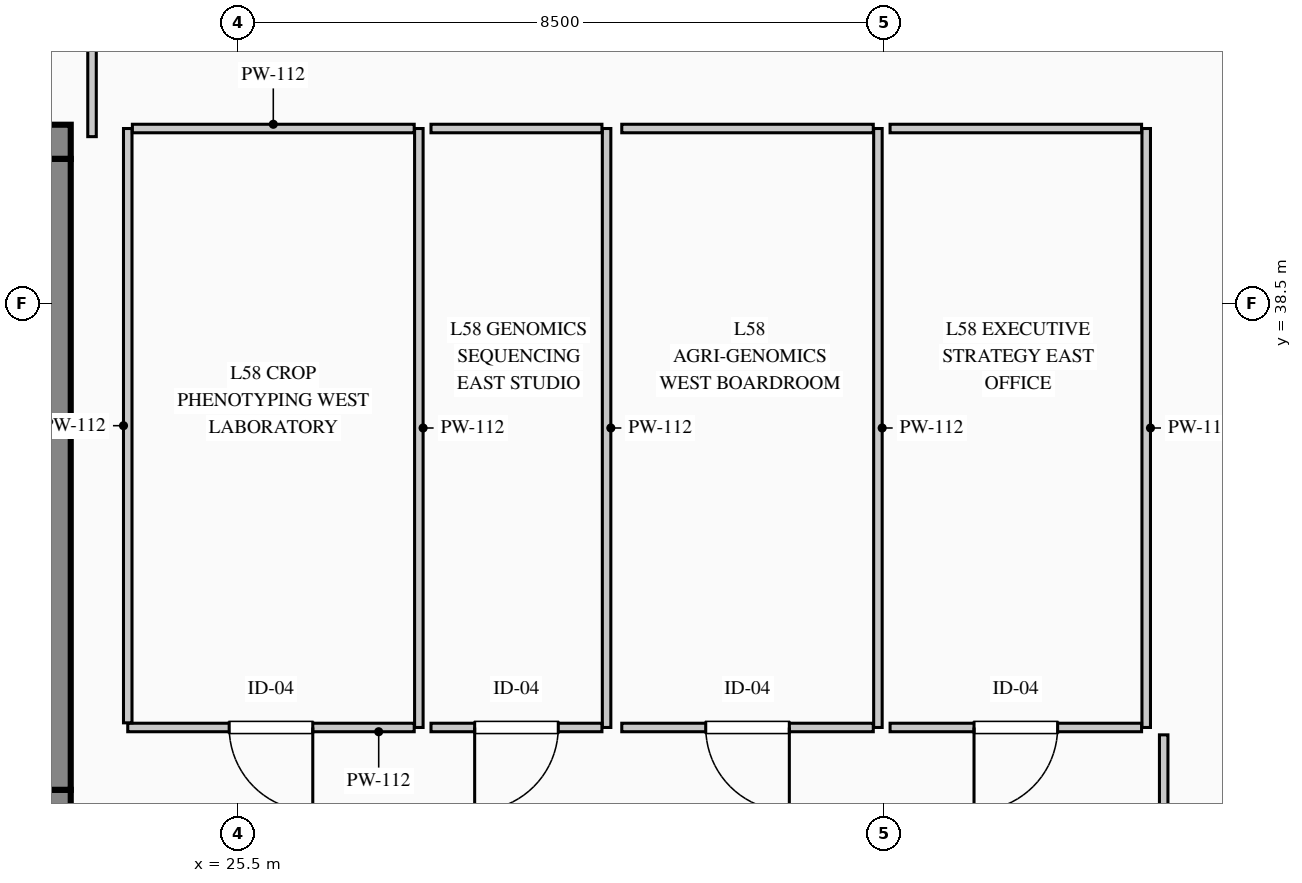
"""IFC4 building model, lengths in metres.
Left out: names, types, materials, properties, quantities, classifications, styles, units other than length and angle.
Written with IfcOpenShell. Run it as: python <this file> out.ifc"""

import sys

from ifc_helpers import new_model, si_unit, direction, frame, frame_2d, origin, place, context, subcontext, project, spatial, rectangle, extrude, element, fill, save


model = new_model("IFC4")
c1 = context("Model", 3, precision=1e-05, world=origin(), true_north=direction((0.0, 1.0)))
c2 = subcontext(c1, "Body", "Model", "MODEL_VIEW")
j1 = project(units=[si_unit("LENGTHUNIT", "METRE"), si_unit("PLANEANGLEUNIT", "RADIAN")], contexts=[c1])
p1 = place(None, origin())
s1 = spatial("IfcSite", under=j1, at=p1, CompositionType="ELEMENT")
p2 = place(p1, origin())
s2 = spatial("IfcBuilding", under=s1, at=p2, CompositionType="ELEMENT")
p3 = place(p2, frame((0.0, 0.0, 243.0)))
s3 = spatial("IfcBuildingStorey", under=s2, at=p3, CompositionType="ELEMENT", Elevation=243.0)
p4 = place(p3, frame((5.55, 40.625, 0.0), z_axis=(0.0, 0.0, 1.0), x_axis=(1.0, 0.0, 0.0)))
e1 = element("IfcWall", 1, at=p4, inside=s3, PredefinedType="SHEAR", context=c2, shape_type="SweptSolid", body=[
    extrude(rectangle(XDim=17.75, YDim=0.45, at=frame_2d((8.875, 0.0))), origin(), (0.0, 0.0, 1.0), 3.95),
])
p5 = place(p4, frame((15.895, 0.0, 0.0)))
e2 = element("IfcOpeningElement", 2, at=p5, cuts=e1, PredefinedType="OPENING", context=c2, shape_type="SweptSolid", body=[
    extrude(rectangle(XDim=1.18, YDim=2.25, at=frame_2d((0.59, 1.125))), frame((0.0, 0.235, 0.0), z_axis=(0.0, -1.0, 0.0), x_axis=(1.0, 0.0, 0.0)), (0.0, 0.0, 1.0), 0.47),
])
p6 = place(p3, frame((5.55, 31.875, 0.0), z_axis=(0.0, 0.0, 1.0), x_axis=(1.0, 0.0, 0.0)))
e3 = element("IfcWall", 3, at=p6, inside=s3, PredefinedType="SHEAR", context=c2, shape_type="SweptSolid", body=[
    extrude(rectangle(XDim=17.75, YDim=0.45, at=frame_2d((8.875, 0.0))), origin(), (0.0, 0.0, 1.0), 3.95),
])
p7 = place(p6, frame((3.1, 0.0, 0.0)))
e4 = element("IfcOpeningElement", 4, at=p7, cuts=e3, PredefinedType="OPENING", context=c2, shape_type="SweptSolid", body=[
    extrude(rectangle(XDim=1.2, YDim=2.2, at=frame_2d((0.6, 1.1))), frame((0.0, 0.235, 0.0), z_axis=(0.0, -1.0, 0.0), x_axis=(1.0, 0.0, 0.0)), (0.0, 0.0, 1.0), 0.47),
])
p8 = place(p6, frame((6.95, 0.0, 0.0)))
e5 = element("IfcOpeningElement", 5, at=p8, cuts=e3, PredefinedType="OPENING", context=c2, shape_type="SweptSolid", body=[
    extrude(rectangle(XDim=1.2, YDim=2.2, at=frame_2d((0.6, 1.1))), frame((0.0, 0.235, 0.0), z_axis=(0.0, -1.0, 0.0), x_axis=(1.0, 0.0, 0.0)), (0.0, 0.0, 1.0), 0.47),
])
p9 = place(p6, frame((8.8, 0.0, 0.0)))
e6 = element("IfcOpeningElement", 6, at=p9, cuts=e3, PredefinedType="OPENING", context=c2, shape_type="SweptSolid", body=[
    extrude(rectangle(XDim=1.15, YDim=2.2, at=frame_2d((0.575, 1.1))), frame((0.0, 0.235, 0.0), z_axis=(0.0, -1.0, 0.0), x_axis=(1.0, 0.0, 0.0)), (0.0, 0.0, 1.0), 0.47),
])
p10 = place(p6, frame((15.9, 0.0, 0.0)))
e7 = element("IfcOpeningElement", 7, at=p10, cuts=e3, PredefinedType="OPENING", context=c2, shape_type="SweptSolid", body=[
    extrude(rectangle(XDim=1.2, YDim=2.2, at=frame_2d((0.6, 1.1))), frame((0.0, 0.235, 0.0), z_axis=(0.0, -1.0, 0.0), x_axis=(1.0, 0.0, 0.0)), (0.0, 0.0, 1.0), 0.47),
])
p11 = place(p3, frame((23.075, 32.1, 0.0), z_axis=(0.0, 0.0, 1.0), x_axis=(0.0, 1.0, 0.0)))
e8 = element("IfcWall", 8, at=p11, inside=s3, PredefinedType="SHEAR", context=c2, shape_type="SweptSolid", body=[
    extrude(rectangle(XDim=8.3, YDim=0.45, at=frame_2d((4.15, 0.0))), origin(), (0.0, 0.0, 1.0), 3.95),
])
p12 = place(p3, frame((27.88, 40.8, 0.0), z_axis=(0.0, 0.0, 1.0), x_axis=(0.0, -1.0, 0.0)))
e9 = element("IfcWall", 9, at=p12, inside=s3, PredefinedType="PARTITIONING", context=c2, shape_type="SweptSolid", body=[
    extrude(rectangle(XDim=7.88, YDim=0.112, at=frame_2d((3.94, 0.0))), origin(), (0.0, 0.0, 1.0), 3.7),
])
p13 = place(p3, frame((27.819, 32.92, 0.0), z_axis=(0.0, 0.0, 1.0), x_axis=(-1.0, 0.0, 0.0)))
e10 = element("IfcWall", 10, at=p13, inside=s3, PredefinedType="PARTITIONING", context=c2, shape_type="SweptSolid", body=[
    extrude(rectangle(XDim=3.769, YDim=0.112, at=frame_2d((1.885, 0.0))), origin(), (0.0, 0.0, 1.0), 3.7),
])
p14 = place(p13, frame((1.334, 0.0, 0.0)))
e11 = element("IfcOpeningElement", 11, at=p14, cuts=e10, PredefinedType="OPENING", context=c2, shape_type="SweptSolid", body=[
    extrude(rectangle(XDim=1.1, YDim=2.2, at=frame_2d((0.55, 1.1))), frame((0.0, 0.066, 0.0), z_axis=(0.0, -1.0, 0.0), x_axis=(1.0, 0.0, 0.0)), (0.0, 0.0, 1.0), 0.132),
])
p15 = place(p3, frame((24.05, 32.981, 0.0), z_axis=(0.0, 0.0, 1.0), x_axis=(0.0, 1.0, 0.0)))
e12 = element("IfcWall", 12, at=p15, inside=s3, PredefinedType="PARTITIONING", context=c2, shape_type="SweptSolid", body=[
    extrude(rectangle(XDim=7.819, YDim=0.112, at=frame_2d((3.91, 0.0))), origin(), (0.0, 0.0, 1.0), 3.7),
])
p16 = place(p3, frame((24.111, 40.8, 0.0), z_axis=(0.0, 0.0, 1.0), x_axis=(1.0, 0.0, 0.0)))
e13 = element("IfcWall", 13, at=p16, inside=s3, PredefinedType="PARTITIONING", context=c2, shape_type="SweptSolid", body=[
    extrude(rectangle(XDim=3.708, YDim=0.112, at=frame_2d((1.854, 0.0))), origin(), (0.0, 0.0, 1.0), 3.7),
])
p17 = place(p3, frame((30.35, 40.8, 0.0), z_axis=(0.0, 0.0, 1.0), x_axis=(0.0, -1.0, 0.0)))
e14 = element("IfcWall", 14, at=p17, inside=s3, PredefinedType="PARTITIONING", context=c2, shape_type="SweptSolid", body=[
    extrude(rectangle(XDim=7.88, YDim=0.112, at=frame_2d((3.94, 0.0))), origin(), (0.0, 0.0, 1.0), 3.7),
])
p18 = place(p3, frame((30.289, 32.92, 0.0), z_axis=(0.0, 0.0, 1.0), x_axis=(-1.0, 0.0, 0.0)))
e15 = element("IfcWall", 15, at=p18, inside=s3, PredefinedType="PARTITIONING", context=c2, shape_type="SweptSolid", body=[
    extrude(rectangle(XDim=2.249, YDim=0.112, at=frame_2d((1.125, 0.0))), origin(), (0.0, 0.0, 1.0), 3.7),
])
p19 = place(p18, frame((0.574, 0.0, 0.0)))
e16 = element("IfcOpeningElement", 16, at=p19, cuts=e15, PredefinedType="OPENING", context=c2, shape_type="SweptSolid", body=[
    extrude(rectangle(XDim=1.1, YDim=2.2, at=frame_2d((0.55, 1.1))), frame((0.0, 0.066, 0.0), z_axis=(0.0, -1.0, 0.0), x_axis=(1.0, 0.0, 0.0)), (0.0, 0.0, 1.0), 0.132),
])
p20 = place(p3, frame((28.04, 40.8, 0.0), z_axis=(0.0, 0.0, 1.0), x_axis=(1.0, 0.0, 0.0)))
e17 = element("IfcWall", 17, at=p20, inside=s3, PredefinedType="PARTITIONING", context=c2, shape_type="SweptSolid", body=[
    extrude(rectangle(XDim=2.249, YDim=0.112, at=frame_2d((1.125, 0.0))), origin(), (0.0, 0.0, 1.0), 3.7),
])
p21 = place(p3, frame((33.92, 40.8, 0.0), z_axis=(0.0, 0.0, 1.0), x_axis=(0.0, -1.0, 0.0)))
e18 = element("IfcWall", 18, at=p21, inside=s3, PredefinedType="PARTITIONING", context=c2, shape_type="SweptSolid", body=[
    extrude(rectangle(XDim=7.88, YDim=0.112, at=frame_2d((3.94, 0.0))), origin(), (0.0, 0.0, 1.0), 3.7),
])
p22 = place(p3, frame((33.859, 32.92, 0.0), z_axis=(0.0, 0.0, 1.0), x_axis=(-1.0, 0.0, 0.0)))
e19 = element("IfcWall", 19, at=p22, inside=s3, PredefinedType="PARTITIONING", context=c2, shape_type="SweptSolid", body=[
    extrude(rectangle(XDim=3.309, YDim=0.112, at=frame_2d((1.654, 0.0))), origin(), (0.0, 0.0, 1.0), 3.7),
])
p23 = place(p22, frame((1.104, 0.0, 0.0)))
e20 = element("IfcOpeningElement", 20, at=p23, cuts=e19, PredefinedType="OPENING", context=c2, shape_type="SweptSolid", body=[
    extrude(rectangle(XDim=1.1, YDim=2.2, at=frame_2d((0.55, 1.1))), frame((0.0, 0.066, 0.0), z_axis=(0.0, -1.0, 0.0), x_axis=(1.0, 0.0, 0.0)), (0.0, 0.0, 1.0), 0.132),
])
p24 = place(p3, frame((30.55, 40.8, 0.0), z_axis=(0.0, 0.0, 1.0), x_axis=(1.0, 0.0, 0.0)))
e21 = element("IfcWall", 21, at=p24, inside=s3, PredefinedType="PARTITIONING", context=c2, shape_type="SweptSolid", body=[
    extrude(rectangle(XDim=3.309, YDim=0.112, at=frame_2d((1.654, 0.0))), origin(), (0.0, 0.0, 1.0), 3.7),
])
p25 = place(p3, frame((37.45, 40.8, 0.0), z_axis=(0.0, 0.0, 1.0), x_axis=(0.0, -1.0, 0.0)))
e22 = element("IfcWall", 22, at=p25, inside=s3, PredefinedType="PARTITIONING", context=c2, shape_type="SweptSolid", body=[
    extrude(rectangle(XDim=7.88, YDim=0.112, at=frame_2d((3.94, 0.0))), origin(), (0.0, 0.0, 1.0), 3.7),
])
p26 = place(p3, frame((37.389, 32.92, 0.0), z_axis=(0.0, 0.0, 1.0), x_axis=(-1.0, 0.0, 0.0)))
e23 = element("IfcWall", 23, at=p26, inside=s3, PredefinedType="PARTITIONING", context=c2, shape_type="SweptSolid", body=[
    extrude(rectangle(XDim=3.309, YDim=0.112, at=frame_2d((1.654, 0.0))), origin(), (0.0, 0.0, 1.0), 3.7),
])
p27 = place(p26, frame((1.104, 0.0, 0.0)))
e24 = element("IfcOpeningElement", 24, at=p27, cuts=e23, PredefinedType="OPENING", context=c2, shape_type="SweptSolid", body=[
    extrude(rectangle(XDim=1.1, YDim=2.2, at=frame_2d((0.55, 1.1))), frame((0.0, 0.066, 0.0), z_axis=(0.0, -1.0, 0.0), x_axis=(1.0, 0.0, 0.0)), (0.0, 0.0, 1.0), 0.132),
])
p28 = place(p3, frame((34.08, 40.8, 0.0), z_axis=(0.0, 0.0, 1.0), x_axis=(1.0, 0.0, 0.0)))
e25 = element("IfcWall", 25, at=p28, inside=s3, PredefinedType="PARTITIONING", context=c2, shape_type="SweptSolid", body=[
    extrude(rectangle(XDim=3.309, YDim=0.112, at=frame_2d((1.654, 0.0))), origin(), (0.0, 0.0, 1.0), 3.7),
])
p29 = place(p3, frame((23.58, 40.693, 0.0), z_axis=(0.0, 0.0, 1.0), x_axis=(0.0, 1.0, 0.0)))
e26 = element("IfcWall", 26, at=p29, inside=s3, PredefinedType="PARTITIONING", context=c2, shape_type="SweptSolid", body=[
    extrude(rectangle(XDim=2.582, YDim=0.112, at=frame_2d((1.291, 0.0))), origin(), (0.0, 0.0, 1.0), 3.7),
])
p30 = place(p3, frame((37.68, 29.081, 0.0), z_axis=(0.0, 0.0, 1.0), x_axis=(0.0, 1.0, 0.0)))
e27 = element("IfcWall", 27, at=p30, inside=s3, PredefinedType="PARTITIONING", context=c2, shape_type="SweptSolid", body=[
    extrude(rectangle(XDim=3.742, YDim=0.112, at=frame_2d((1.871, 0.0))), origin(), (0.0, 0.0, 1.0), 3.7),
])
p31 = place(p14, origin())
e28 = element("IfcDoor", 28, at=p31, inside=s3, OperationType="SINGLE_SWING_LEFT", PredefinedType="DOOR", context=c2, shape_type="SweptSolid", body=[
    extrude(rectangle(XDim=1.1, YDim=2.2, at=frame_2d((0.55, 1.1))), frame((0.0, 0.025, 0.0), z_axis=(0.0, -1.0, 0.0), x_axis=(1.0, 0.0, 0.0)), (0.0, 0.0, 1.0), 0.05),
])
fill(e11, e28)
p32 = place(p19, origin())
e29 = element("IfcDoor", 29, at=p32, inside=s3, OperationType="SINGLE_SWING_RIGHT", PredefinedType="DOOR", context=c2, shape_type="SweptSolid", body=[
    extrude(rectangle(XDim=1.1, YDim=2.2, at=frame_2d((0.55, 1.1))), frame((0.0, 0.025, 0.0), z_axis=(0.0, -1.0, 0.0), x_axis=(1.0, 0.0, 0.0)), (0.0, 0.0, 1.0), 0.05),
])
fill(e16, e29)
p33 = place(p23, origin())
e30 = element("IfcDoor", 30, at=p33, inside=s3, OperationType="SINGLE_SWING_LEFT", PredefinedType="DOOR", context=c2, shape_type="SweptSolid", body=[
    extrude(rectangle(XDim=1.1, YDim=2.2, at=frame_2d((0.55, 1.1))), frame((0.0, 0.025, 0.0), z_axis=(0.0, -1.0, 0.0), x_axis=(1.0, 0.0, 0.0)), (0.0, 0.0, 1.0), 0.05),
])
fill(e20, e30)
p34 = place(p27, origin())
e31 = element("IfcDoor", 31, at=p34, inside=s3, OperationType="SINGLE_SWING_RIGHT", PredefinedType="DOOR", context=c2, shape_type="SweptSolid", body=[
    extrude(rectangle(XDim=1.1, YDim=2.2, at=frame_2d((0.55, 1.1))), frame((0.0, 0.025, 0.0), z_axis=(0.0, -1.0, 0.0), x_axis=(1.0, 0.0, 0.0)), (0.0, 0.0, 1.0), 0.05),
])
fill(e24, e31)
save(model, sys.argv[1])
